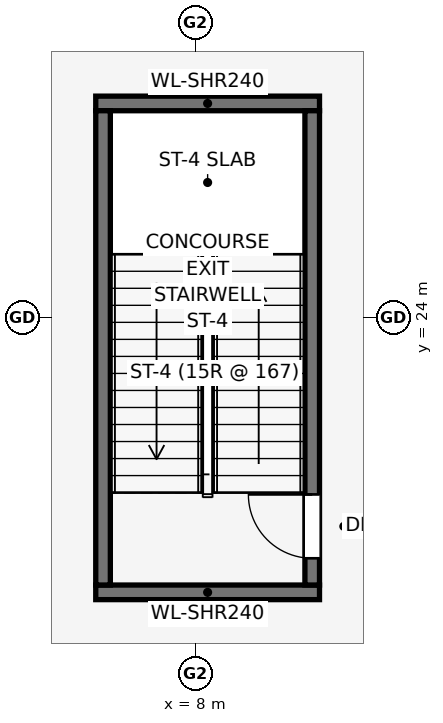
"""IFC4 building model, lengths in metres.
Left out: names, types, materials, properties, quantities, classifications, styles, units other than length and angle.
Written with IfcOpenShell. Run it as: python <this file> out.ifc"""

import sys

from ifc_helpers import new_model, si_unit, direction, frame, frame_2d, origin, place, context, subcontext, project, spatial, rectangle, extrude, element, fill, save


model = new_model("IFC4")
c1 = context("Model", 3, precision=1e-05, world=origin(), true_north=direction((0.0, 1.0)))
c2 = subcontext(c1, "Body", "Model", "MODEL_VIEW")
j1 = project(units=[si_unit("LENGTHUNIT", "METRE"), si_unit("PLANEANGLEUNIT", "RADIAN")], contexts=[c1])
p1 = place(None, origin())
s1 = spatial("IfcSite", under=j1, at=p1, CompositionType="ELEMENT")
p2 = place(p1, origin())
s2 = spatial("IfcBuilding", under=s1, at=p2, CompositionType="ELEMENT")
p3 = place(p2, frame((0.0, 0.0, 6.0)))
s3 = spatial("IfcBuildingStorey", under=s2, at=p3, CompositionType="ELEMENT", Elevation=6.0)
for number, where, z_axis, x_axis in (
    (1, (6.36, 19.48, 0.0), (0.0, 0.0, 1.0), (1.0, 0.0, 0.0)),
    (2, (10.04, 27.52, 0.0), (0.0, 0.0, 1.0), (-1.0, 0.0, 0.0)),
):
    element("IfcWall", number, at=place(p3, frame(where, z_axis=z_axis, x_axis=x_axis)), inside=s3, PredefinedType="SHEAR", context=c2, shape_type="SweptSolid", body=[
        extrude(rectangle(XDim=3.68, YDim=0.24, at=frame_2d((1.84, 0.0))), origin(), (0.0, 0.0, 1.0), 5.0),
    ])
p4 = place(p3, frame((6.48, 27.4, 0.0), z_axis=(0.0, 0.0, 1.0), x_axis=(0.0, -1.0, 0.0)))
e3 = element("IfcWall", 3, at=p4, inside=s3, PredefinedType="SHEAR", context=c2, shape_type="SweptSolid", body=[
    extrude(rectangle(XDim=7.8, YDim=0.24, at=frame_2d((3.9, 0.0))), origin(), (0.0, 0.0, 1.0), 5.0),
])
p5 = place(p3, frame((9.92, 19.6, 0.0), z_axis=(0.0, 0.0, 1.0), x_axis=(0.0, 1.0, 0.0)))
e4 = element("IfcWall", 4, at=p5, inside=s3, PredefinedType="SHEAR", context=c2, shape_type="SweptSolid", body=[
    extrude(rectangle(XDim=7.8, YDim=0.24, at=frame_2d((3.9, 0.0))), origin(), (0.0, 0.0, 1.0), 5.0),
])
p6 = place(p5, frame((0.44, 0.0, 0.0)))
e5 = element("IfcOpeningElement", 5, at=p6, cuts=e4, PredefinedType="OPENING", context=c2, shape_type="SweptSolid", body=[
    extrude(rectangle(XDim=1.05, YDim=2.0, at=frame_2d((0.525, 1.0))), frame((0.0, 0.13, 0.0), z_axis=(0.0, -1.0, 0.0), x_axis=(1.0, 0.0, 0.0)), (0.0, 0.0, 1.0), 0.26),
])
p7 = place(p6, origin())
e6 = element("IfcDoor", 6, at=p7, inside=s3, OperationType="SINGLE_SWING_RIGHT", PredefinedType="DOOR", context=c2, shape_type="SweptSolid", body=[
    extrude(rectangle(XDim=1.05, YDim=2.0, at=frame_2d((0.525, 1.0))), frame((0.0, 0.025, 0.0), z_axis=(0.0, -1.0, 0.0), x_axis=(1.0, 0.0, 0.0)), (0.0, 0.0, 1.0), 0.05),
])
fill(e5, e6)
save(model, sys.argv[1])
